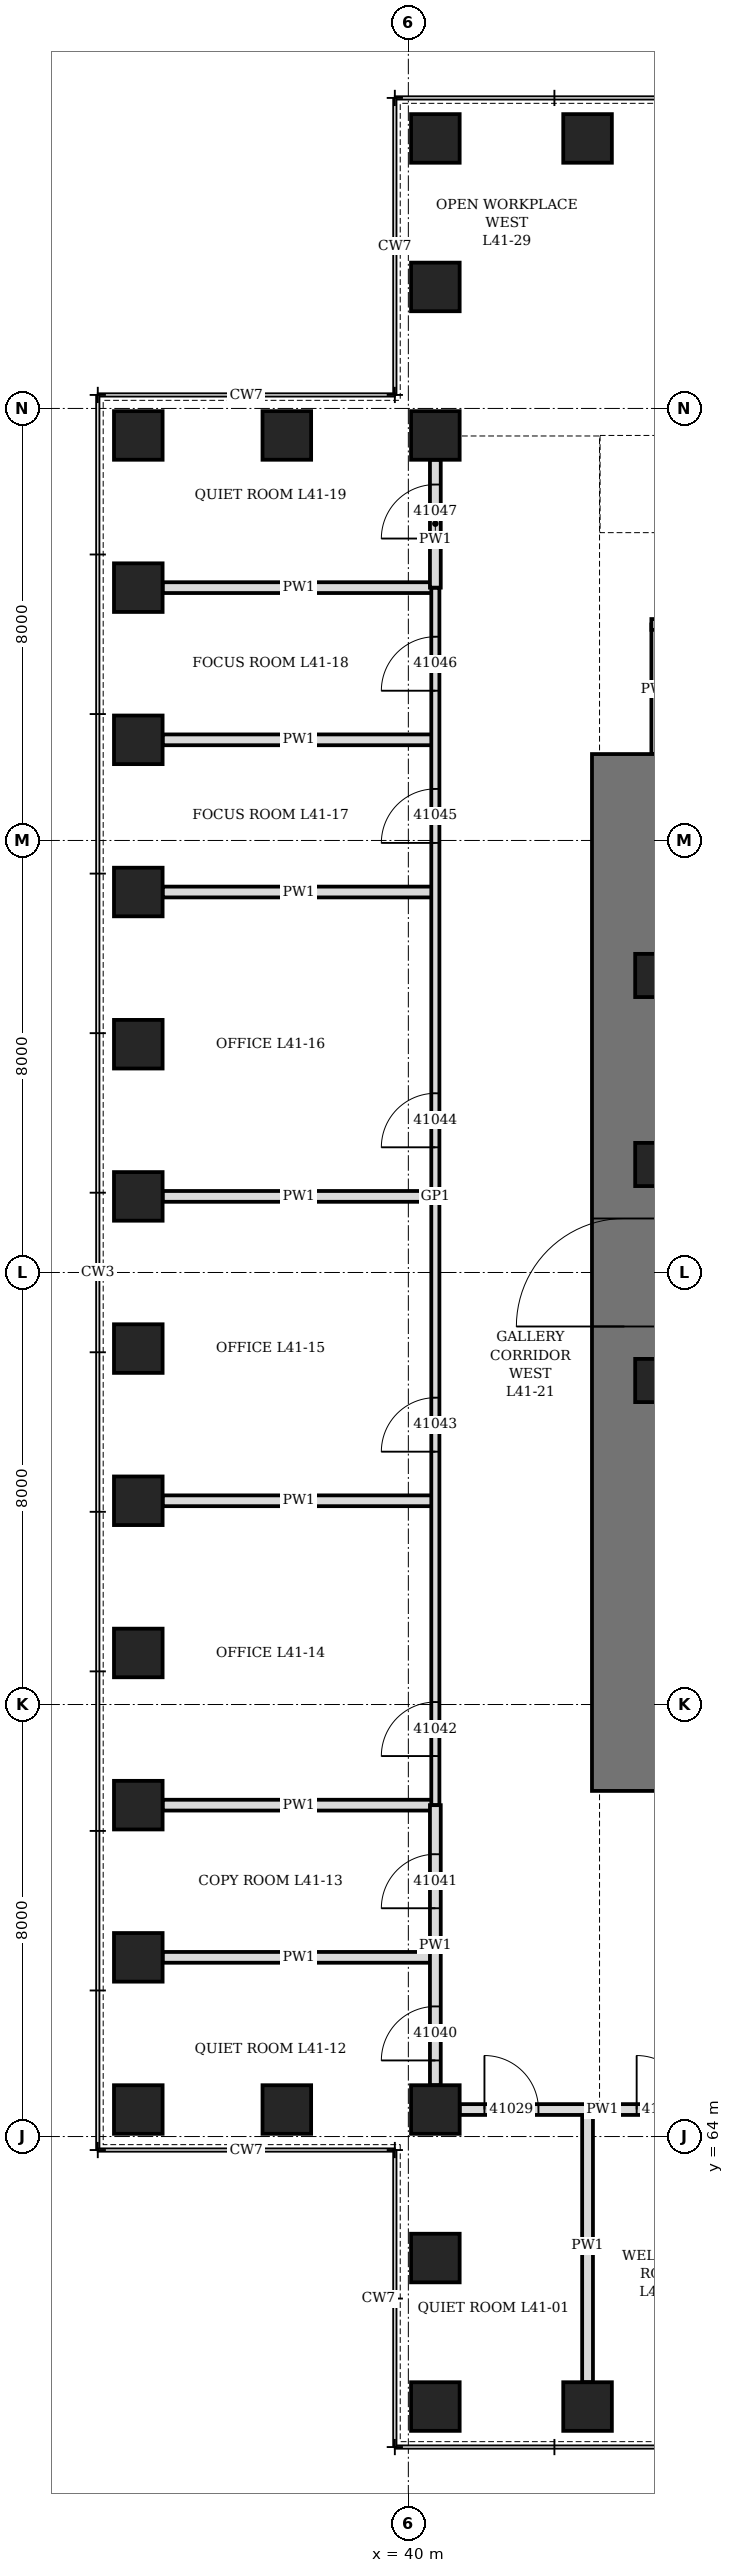
"""IFC4 building model, lengths in metres.
Left out: names, types, materials, properties, quantities, classifications, styles, units other than length and angle.
Written with IfcOpenShell. Run it as: python <this file> out.ifc"""

import sys

from ifc_helpers import new_model, si_unit, direction, frame, frame_2d, origin, origin_2d, place, context, subcontext, project, spatial, rectangle, hollow_rectangle, extrude, element, fill, save


model = new_model("IFC4")
c1 = context("Model", 3, precision=1e-05, world=origin(), true_north=direction((0.0, 1.0)))
c2 = subcontext(c1, "Body", "Model", "MODEL_VIEW")
j1 = project(units=[si_unit("LENGTHUNIT", "METRE"), si_unit("PLANEANGLEUNIT", "RADIAN")], contexts=[c1])
p1 = place(None, origin())
s1 = spatial("IfcSite", under=j1, at=p1, CompositionType="ELEMENT")
p2 = place(p1, origin())
s2 = spatial("IfcBuilding", under=s1, at=p2, CompositionType="ELEMENT")
p3 = place(p2, frame((0.0, 0.0, 185.5)))
s3 = spatial("IfcBuildingStorey", under=s2, at=p3, CompositionType="ELEMENT", Elevation=185.5)
for number, where, z_axis, x_axis in (
    (1, (40.5, 59.0, 0.0), (0.0, 0.0, 1.0), (1.0, 0.0, 0.0)),
    (2, (43.318, 59.0, 0.0), (0.0, 0.0, 1.0), (1.0, 0.0, 0.0)),
    (3, (43.318, 101.0, 0.0), (0.0, 0.0, 1.0), (1.0, 0.0, 0.0)),
    (4, (40.5, 101.0, 0.0), (0.0, 0.0, 1.0), (0.0, 1.0, 0.0)),
    (5, (40.5, 98.25, 0.0), (0.0, 0.0, 1.0), (0.0, 1.0, 0.0)),
    (6, (40.5, 95.5, 0.0), (0.0, 0.0, 1.0), (1.0, 0.0, 0.0)),
    (7, (37.75, 95.5, 0.0), (0.0, 0.0, 1.0), (1.0, 0.0, 0.0)),
    (8, (35.0, 95.5, 0.0), (0.0, 0.0, 1.0), (0.0, 1.0, 0.0)),
    (9, (35.0, 92.682, 0.0), (0.0, 0.0, 1.0), (0.0, 1.0, 0.0)),
    (10, (35.0, 89.864, 0.0), (0.0, 0.0, 1.0), (0.0, 1.0, 0.0)),
    (11, (35.0, 87.045, 0.0), (0.0, 0.0, 1.0), (0.0, 1.0, 0.0)),
    (12, (35.0, 84.227, 0.0), (0.0, 0.0, 1.0), (0.0, 1.0, 0.0)),
    (13, (35.0, 81.409, 0.0), (0.0, 0.0, 1.0), (0.0, 1.0, 0.0)),
    (14, (35.0, 78.591, 0.0), (0.0, 0.0, 1.0), (0.0, 1.0, 0.0)),
    (15, (35.0, 75.773, 0.0), (0.0, 0.0, 1.0), (0.0, 1.0, 0.0)),
    (16, (35.0, 72.955, 0.0), (0.0, 0.0, 1.0), (0.0, 1.0, 0.0)),
    (17, (35.0, 70.136, 0.0), (0.0, 0.0, 1.0), (0.0, 1.0, 0.0)),
    (18, (35.0, 67.318, 0.0), (0.0, 0.0, 1.0), (0.0, 1.0, 0.0)),
    (19, (35.0, 64.5, 0.0), (0.0, 0.0, 1.0), (1.0, 0.0, 0.0)),
    (20, (37.75, 64.5, 0.0), (0.0, 0.0, 1.0), (1.0, 0.0, 0.0)),
    (21, (40.5, 64.5, 0.0), (0.0, 0.0, 1.0), (0.0, 1.0, 0.0)),
    (22, (40.5, 61.75, 0.0), (0.0, 0.0, 1.0), (0.0, 1.0, 0.0)),
):
    element("IfcColumn", number, at=place(p3, frame(where, z_axis=z_axis, x_axis=x_axis)), inside=s3, PredefinedType="COLUMN", context=c2, shape_type="SweptSolid", body=[
        extrude(hollow_rectangle(XDim=0.9, YDim=0.9, WallThickness=0.12, at=origin_2d()), origin(), (0.0, 0.0, 1.0), 4.2),
    ])
p4 = place(p3, frame((44.0, 70.4, 0.0), z_axis=(0.0, 0.0, 1.0), x_axis=(0.0, 1.0, 0.0)))
e23 = element("IfcWall", 23, at=p4, inside=s3, PredefinedType="SHEAR", context=c2, shape_type="SweptSolid", body=[
    extrude(rectangle(XDim=19.2, YDim=1.2, at=frame_2d((9.6, 0.0))), origin(), (0.0, 0.0, 1.0), 4.2),
])
p5 = place(p4, frame((8.6, 0.0, 0.0)))
e24 = element("IfcOpeningElement", 24, at=p5, cuts=e23, PredefinedType="OPENING", context=c2, shape_type="SweptSolid", body=[
    extrude(rectangle(XDim=2.0, YDim=2.4, at=frame_2d((1.0, 1.2))), frame((0.0, 0.61, 0.0), z_axis=(0.0, -1.0, 0.0), x_axis=(1.0, 0.0, 0.0)), (0.0, 0.0, 1.0), 1.22),
])
for number, where, z_axis, x_axis in (
    (25, (44.6, 78.0, 0.0), (0.0, 0.0, 1.0), (1.0, 0.0, 0.0)),
    (26, (44.6, 82.0, 0.0), (0.0, 0.0, 1.0), (1.0, 0.0, 0.0)),
    (27, (44.6, 85.5, 0.0), (0.0, 0.0, 1.0), (1.0, 0.0, 0.0)),
):
    element("IfcColumn", number, at=place(p3, frame(where, z_axis=z_axis, x_axis=x_axis)), inside=s3, PredefinedType="COLUMN", context=c2, shape_type="SweptSolid", body=[
        extrude(hollow_rectangle(XDim=0.8, YDim=0.8, WallThickness=0.1, at=origin_2d()), origin(), (0.0, 0.0, 1.0), 4.2),
    ])
for number, where, z_axis, x_axis in (
    (28, (43.318, 59.45, 0.0), (0.0, 0.0, 1.0), (0.0, 1.0, 0.0)),
    (29, (35.45, 67.318, 0.0), (0.0, 0.0, 1.0), (1.0, 0.0, 0.0)),
    (30, (35.45, 70.136, 0.0), (0.0, 0.0, 1.0), (1.0, 0.0, 0.0)),
    (31, (35.45, 75.773, 0.0), (0.0, 0.0, 1.0), (1.0, 0.0, 0.0)),
    (32, (35.45, 81.409, 0.0), (0.0, 0.0, 1.0), (1.0, 0.0, 0.0)),
    (33, (35.45, 87.045, 0.0), (0.0, 0.0, 1.0), (1.0, 0.0, 0.0)),
    (34, (35.45, 89.864, 0.0), (0.0, 0.0, 1.0), (1.0, 0.0, 0.0)),
    (35, (35.45, 92.682, 0.0), (0.0, 0.0, 1.0), (1.0, 0.0, 0.0)),
):
    element("IfcWall", number, at=place(p3, frame(where, z_axis=z_axis, x_axis=x_axis)), inside=s3, PredefinedType="PARTITIONING", context=c2, shape_type="SweptSolid", body=[
        extrude(rectangle(XDim=5.05, YDim=0.2, at=frame_2d((2.525, 0.0))), origin(), (0.0, 0.0, 1.0), 3.428),
    ])
p6 = place(p3, frame((44.6, 89.6, 0.0), z_axis=(0.0, 0.0, 1.0), x_axis=(0.0, 1.0, 0.0)))
e36 = element("IfcWall", 36, at=p6, inside=s3, PredefinedType="PARTITIONING", context=c2, shape_type="SweptSolid", body=[
    extrude(rectangle(XDim=2.4, YDim=0.2, at=frame_2d((1.2, 0.0))), origin(), (0.0, 0.0, 1.0), 4.04),
])
p7 = place(p3, frame((40.95, 64.5, 0.0), z_axis=(0.0, 0.0, 1.0), x_axis=(1.0, 0.0, 0.0)))
e37 = element("IfcWall", 37, at=p7, inside=s3, PredefinedType="PARTITIONING", context=c2, shape_type="SweptSolid", body=[
    extrude(rectangle(XDim=5.286, YDim=0.2, at=frame_2d((2.643, 0.0))), origin(), (0.0, 0.0, 1.0), 4.04),
])
p8 = place(p7, frame((0.459, 0.0, 0.0)))
e38 = element("IfcOpeningElement", 38, at=p8, cuts=e37, PredefinedType="OPENING", context=c2, shape_type="SweptSolid", body=[
    extrude(rectangle(XDim=1.0, YDim=2.1, at=frame_2d((0.5, 1.05))), frame((0.0, 0.11, 0.0), z_axis=(0.0, -1.0, 0.0), x_axis=(1.0, 0.0, 0.0)), (0.0, 0.0, 1.0), 0.22),
])
p9 = place(p7, frame((3.277, 0.0, 0.0)))
e39 = element("IfcOpeningElement", 39, at=p9, cuts=e37, PredefinedType="OPENING", context=c2, shape_type="SweptSolid", body=[
    extrude(rectangle(XDim=1.0, YDim=2.1, at=frame_2d((0.5, 1.05))), frame((0.0, 0.11, 0.0), z_axis=(0.0, -1.0, 0.0), x_axis=(1.0, 0.0, 0.0)), (0.0, 0.0, 1.0), 0.22),
])
p10 = place(p3, frame((44.5, 92.0, 0.0), z_axis=(0.0, 0.0, 1.0), x_axis=(1.0, 0.0, 0.0)))
e40 = element("IfcWall", 40, at=p10, inside=s3, PredefinedType="PARTITIONING", context=c2, shape_type="SweptSolid", body=[
    extrude(rectangle(XDim=6.4, YDim=0.2, at=frame_2d((3.2, 0.0))), origin(), (0.0, 0.0, 1.0), 4.04),
])
p11 = place(p10, frame((2.7, 0.0, 0.0)))
e41 = element("IfcOpeningElement", 41, at=p11, cuts=e40, PredefinedType="OPENING", context=c2, shape_type="SweptSolid", body=[
    extrude(rectangle(XDim=1.0, YDim=2.1, at=frame_2d((0.5, 1.05))), frame((0.0, 0.11, 0.0), z_axis=(0.0, -1.0, 0.0), x_axis=(1.0, 0.0, 0.0)), (0.0, 0.0, 1.0), 0.22),
])
p12 = place(p3, frame((40.5, 70.136, 0.0), z_axis=(0.0, 0.0, 1.0), x_axis=(0.0, 1.0, 0.0)))
e42 = element("IfcWall", 42, at=p12, inside=s3, PredefinedType="PARTITIONING", context=c2, shape_type="SweptSolid", body=[
    extrude(rectangle(XDim=22.545, YDim=0.15, at=frame_2d((11.273, 0.0))), origin(), (0.0, 0.0, 1.0), 4.04),
])
p13 = place(p12, frame((0.909, 0.0, 0.0)))
e43 = element("IfcOpeningElement", 43, at=p13, cuts=e42, PredefinedType="OPENING", context=c2, shape_type="SweptSolid", body=[
    extrude(rectangle(XDim=1.0, YDim=2.1, at=frame_2d((0.5, 1.05))), frame((0.0, 0.085, 0.0), z_axis=(0.0, -1.0, 0.0), x_axis=(1.0, 0.0, 0.0)), (0.0, 0.0, 1.0), 0.17),
])
p14 = place(p12, frame((6.545, 0.0, 0.0)))
e44 = element("IfcOpeningElement", 44, at=p14, cuts=e42, PredefinedType="OPENING", context=c2, shape_type="SweptSolid", body=[
    extrude(rectangle(XDim=1.0, YDim=2.1, at=frame_2d((0.5, 1.05))), frame((0.0, 0.085, 0.0), z_axis=(0.0, -1.0, 0.0), x_axis=(1.0, 0.0, 0.0)), (0.0, 0.0, 1.0), 0.17),
])
p15 = place(p12, frame((12.182, 0.0, 0.0)))
e45 = element("IfcOpeningElement", 45, at=p15, cuts=e42, PredefinedType="OPENING", context=c2, shape_type="SweptSolid", body=[
    extrude(rectangle(XDim=1.0, YDim=2.1, at=frame_2d((0.5, 1.05))), frame((0.0, 0.085, 0.0), z_axis=(0.0, -1.0, 0.0), x_axis=(1.0, 0.0, 0.0)), (0.0, 0.0, 1.0), 0.17),
])
p16 = place(p12, frame((17.818, 0.0, 0.0)))
e46 = element("IfcOpeningElement", 46, at=p16, cuts=e42, PredefinedType="OPENING", context=c2, shape_type="SweptSolid", body=[
    extrude(rectangle(XDim=1.0, YDim=2.4, at=frame_2d((0.5, 1.2))), frame((0.0, 0.085, 0.0), z_axis=(0.0, -1.0, 0.0), x_axis=(1.0, 0.0, 0.0)), (0.0, 0.0, 1.0), 0.17),
])
p17 = place(p12, frame((20.636, 0.0, 0.0)))
e47 = element("IfcOpeningElement", 47, at=p17, cuts=e42, PredefinedType="OPENING", context=c2, shape_type="SweptSolid", body=[
    extrude(rectangle(XDim=1.0, YDim=2.4, at=frame_2d((0.5, 1.2))), frame((0.0, 0.085, 0.0), z_axis=(0.0, -1.0, 0.0), x_axis=(1.0, 0.0, 0.0)), (0.0, 0.0, 1.0), 0.17),
])
p18 = place(p3, frame((40.5, 64.95, 0.0), z_axis=(0.0, 0.0, 1.0), x_axis=(0.0, 1.0, 0.0)))
e48 = element("IfcWall", 48, at=p18, inside=s3, PredefinedType="PARTITIONING", context=c2, shape_type="SweptSolid", body=[
    extrude(rectangle(XDim=5.187, YDim=0.2, at=frame_2d((2.593, 0.0))), origin(), (0.0, 0.0, 1.0), 4.04),
])
p19 = place(p18, frame((0.459, 0.0, 0.0)))
e49 = element("IfcOpeningElement", 49, at=p19, cuts=e48, PredefinedType="OPENING", context=c2, shape_type="SweptSolid", body=[
    extrude(rectangle(XDim=1.0, YDim=2.1, at=frame_2d((0.5, 1.05))), frame((0.0, 0.11, 0.0), z_axis=(0.0, -1.0, 0.0), x_axis=(1.0, 0.0, 0.0)), (0.0, 0.0, 1.0), 0.22),
])
p20 = place(p18, frame((3.277, 0.0, 0.0)))
e50 = element("IfcOpeningElement", 50, at=p20, cuts=e48, PredefinedType="OPENING", context=c2, shape_type="SweptSolid", body=[
    extrude(rectangle(XDim=1.0, YDim=2.1, at=frame_2d((0.5, 1.05))), frame((0.0, 0.11, 0.0), z_axis=(0.0, -1.0, 0.0), x_axis=(1.0, 0.0, 0.0)), (0.0, 0.0, 1.0), 0.22),
])
p21 = place(p3, frame((40.5, 92.682, 0.0), z_axis=(0.0, 0.0, 1.0), x_axis=(0.0, 1.0, 0.0)))
e51 = element("IfcWall", 51, at=p21, inside=s3, PredefinedType="PARTITIONING", context=c2, shape_type="SweptSolid", body=[
    extrude(rectangle(XDim=2.368, YDim=0.2, at=frame_2d((1.184, 0.0))), origin(), (0.0, 0.0, 1.0), 4.04),
])
p22 = place(p21, frame((0.909, 0.0, 0.0)))
e52 = element("IfcOpeningElement", 52, at=p22, cuts=e51, PredefinedType="OPENING", context=c2, shape_type="SweptSolid", body=[
    extrude(rectangle(XDim=1.0, YDim=2.1, at=frame_2d((0.5, 1.05))), frame((0.0, 0.11, 0.0), z_axis=(0.0, -1.0, 0.0), x_axis=(1.0, 0.0, 0.0)), (0.0, 0.0, 1.0), 0.22),
])
p23 = place(p5, origin())
e53 = element("IfcDoor", 53, at=p23, inside=s3, OperationType="DOUBLE_DOOR_SINGLE_SWING", PredefinedType="DOOR", context=c2, shape_type="SweptSolid", body=[
    extrude(rectangle(XDim=2.0, YDim=2.4, at=frame_2d((1.0, 1.2))), frame((0.0, 0.35, 0.0), z_axis=(0.0, -1.0, 0.0), x_axis=(1.0, 0.0, 0.0)), (0.0, 0.0, 1.0), 0.7),
])
fill(e24, e53)
p24 = place(p8, origin())
e54 = element("IfcDoor", 54, at=p24, inside=s3, OperationType="SINGLE_SWING_LEFT", PredefinedType="DOOR", context=c2, shape_type="SweptSolid", body=[
    extrude(rectangle(XDim=1.0, YDim=2.1, at=frame_2d((0.5, 1.05))), frame((0.0, 0.1, 0.0), z_axis=(0.0, -1.0, 0.0), x_axis=(1.0, 0.0, 0.0)), (0.0, 0.0, 1.0), 0.199),
])
fill(e38, e54)
p25 = place(p9, origin())
e55 = element("IfcDoor", 55, at=p25, inside=s3, OperationType="SINGLE_SWING_LEFT", PredefinedType="DOOR", context=c2, shape_type="SweptSolid", body=[
    extrude(rectangle(XDim=1.0, YDim=2.1, at=frame_2d((0.5, 1.05))), frame((0.0, 0.1, 0.0), z_axis=(0.0, -1.0, 0.0), x_axis=(1.0, 0.0, 0.0)), (0.0, 0.0, 1.0), 0.199),
])
fill(e39, e55)
p26 = place(p19, origin())
e56 = element("IfcDoor", 56, at=p26, inside=s3, OperationType="SINGLE_SWING_LEFT", PredefinedType="DOOR", context=c2, shape_type="SweptSolid", body=[
    extrude(rectangle(XDim=1.0, YDim=2.1, at=frame_2d((0.5, 1.05))), frame((0.0, 0.1, 0.0), z_axis=(0.0, -1.0, 0.0), x_axis=(1.0, 0.0, 0.0)), (0.0, 0.0, 1.0), 0.199),
])
fill(e49, e56)
p27 = place(p20, origin())
e57 = element("IfcDoor", 57, at=p27, inside=s3, OperationType="SINGLE_SWING_LEFT", PredefinedType="DOOR", context=c2, shape_type="SweptSolid", body=[
    extrude(rectangle(XDim=1.0, YDim=2.1, at=frame_2d((0.5, 1.05))), frame((0.0, 0.1, 0.0), z_axis=(0.0, -1.0, 0.0), x_axis=(1.0, 0.0, 0.0)), (0.0, 0.0, 1.0), 0.199),
])
fill(e50, e57)
p28 = place(p13, origin())
e58 = element("IfcDoor", 58, at=p28, inside=s3, OperationType="SINGLE_SWING_LEFT", PredefinedType="DOOR", context=c2, shape_type="SweptSolid", body=[
    extrude(rectangle(XDim=1.0, YDim=2.1, at=frame_2d((0.5, 1.05))), frame((0.0, 0.075, 0.0), z_axis=(0.0, -1.0, 0.0), x_axis=(1.0, 0.0, 0.0)), (0.0, 0.0, 1.0), 0.149),
])
fill(e43, e58)
p29 = place(p14, origin())
e59 = element("IfcDoor", 59, at=p29, inside=s3, OperationType="SINGLE_SWING_LEFT", PredefinedType="DOOR", context=c2, shape_type="SweptSolid", body=[
    extrude(rectangle(XDim=1.0, YDim=2.1, at=frame_2d((0.5, 1.05))), frame((0.0, 0.075, 0.0), z_axis=(0.0, -1.0, 0.0), x_axis=(1.0, 0.0, 0.0)), (0.0, 0.0, 1.0), 0.149),
])
fill(e44, e59)
p30 = place(p15, origin())
e60 = element("IfcDoor", 60, at=p30, inside=s3, OperationType="SINGLE_SWING_LEFT", PredefinedType="DOOR", context=c2, shape_type="SweptSolid", body=[
    extrude(rectangle(XDim=1.0, YDim=2.1, at=frame_2d((0.5, 1.05))), frame((0.0, 0.075, 0.0), z_axis=(0.0, -1.0, 0.0), x_axis=(1.0, 0.0, 0.0)), (0.0, 0.0, 1.0), 0.149),
])
fill(e45, e60)
p31 = place(p16, origin())
e61 = element("IfcDoor", 61, at=p31, inside=s3, OperationType="SINGLE_SWING_RIGHT", PredefinedType="DOOR", context=c2, shape_type="SweptSolid", body=[
    extrude(rectangle(XDim=1.0, YDim=2.4, at=frame_2d((0.5, 1.2))), frame((0.0, 0.075, 0.0), z_axis=(0.0, -1.0, 0.0), x_axis=(1.0, 0.0, 0.0)), (0.0, 0.0, 1.0), 0.149),
])
fill(e46, e61)
p32 = place(p17, origin())
e62 = element("IfcDoor", 62, at=p32, inside=s3, OperationType="SINGLE_SWING_RIGHT", PredefinedType="DOOR", context=c2, shape_type="SweptSolid", body=[
    extrude(rectangle(XDim=1.0, YDim=2.4, at=frame_2d((0.5, 1.2))), frame((0.0, 0.075, 0.0), z_axis=(0.0, -1.0, 0.0), x_axis=(1.0, 0.0, 0.0)), (0.0, 0.0, 1.0), 0.149),
])
fill(e47, e62)
p33 = place(p22, origin())
e63 = element("IfcDoor", 63, at=p33, inside=s3, OperationType="SINGLE_SWING_LEFT", PredefinedType="DOOR", context=c2, shape_type="SweptSolid", body=[
    extrude(rectangle(XDim=1.0, YDim=2.1, at=frame_2d((0.5, 1.05))), frame((0.0, 0.1, 0.0), z_axis=(0.0, -1.0, 0.0), x_axis=(1.0, 0.0, 0.0)), (0.0, 0.0, 1.0), 0.199),
])
fill(e52, e63)
save(model, sys.argv[1])
